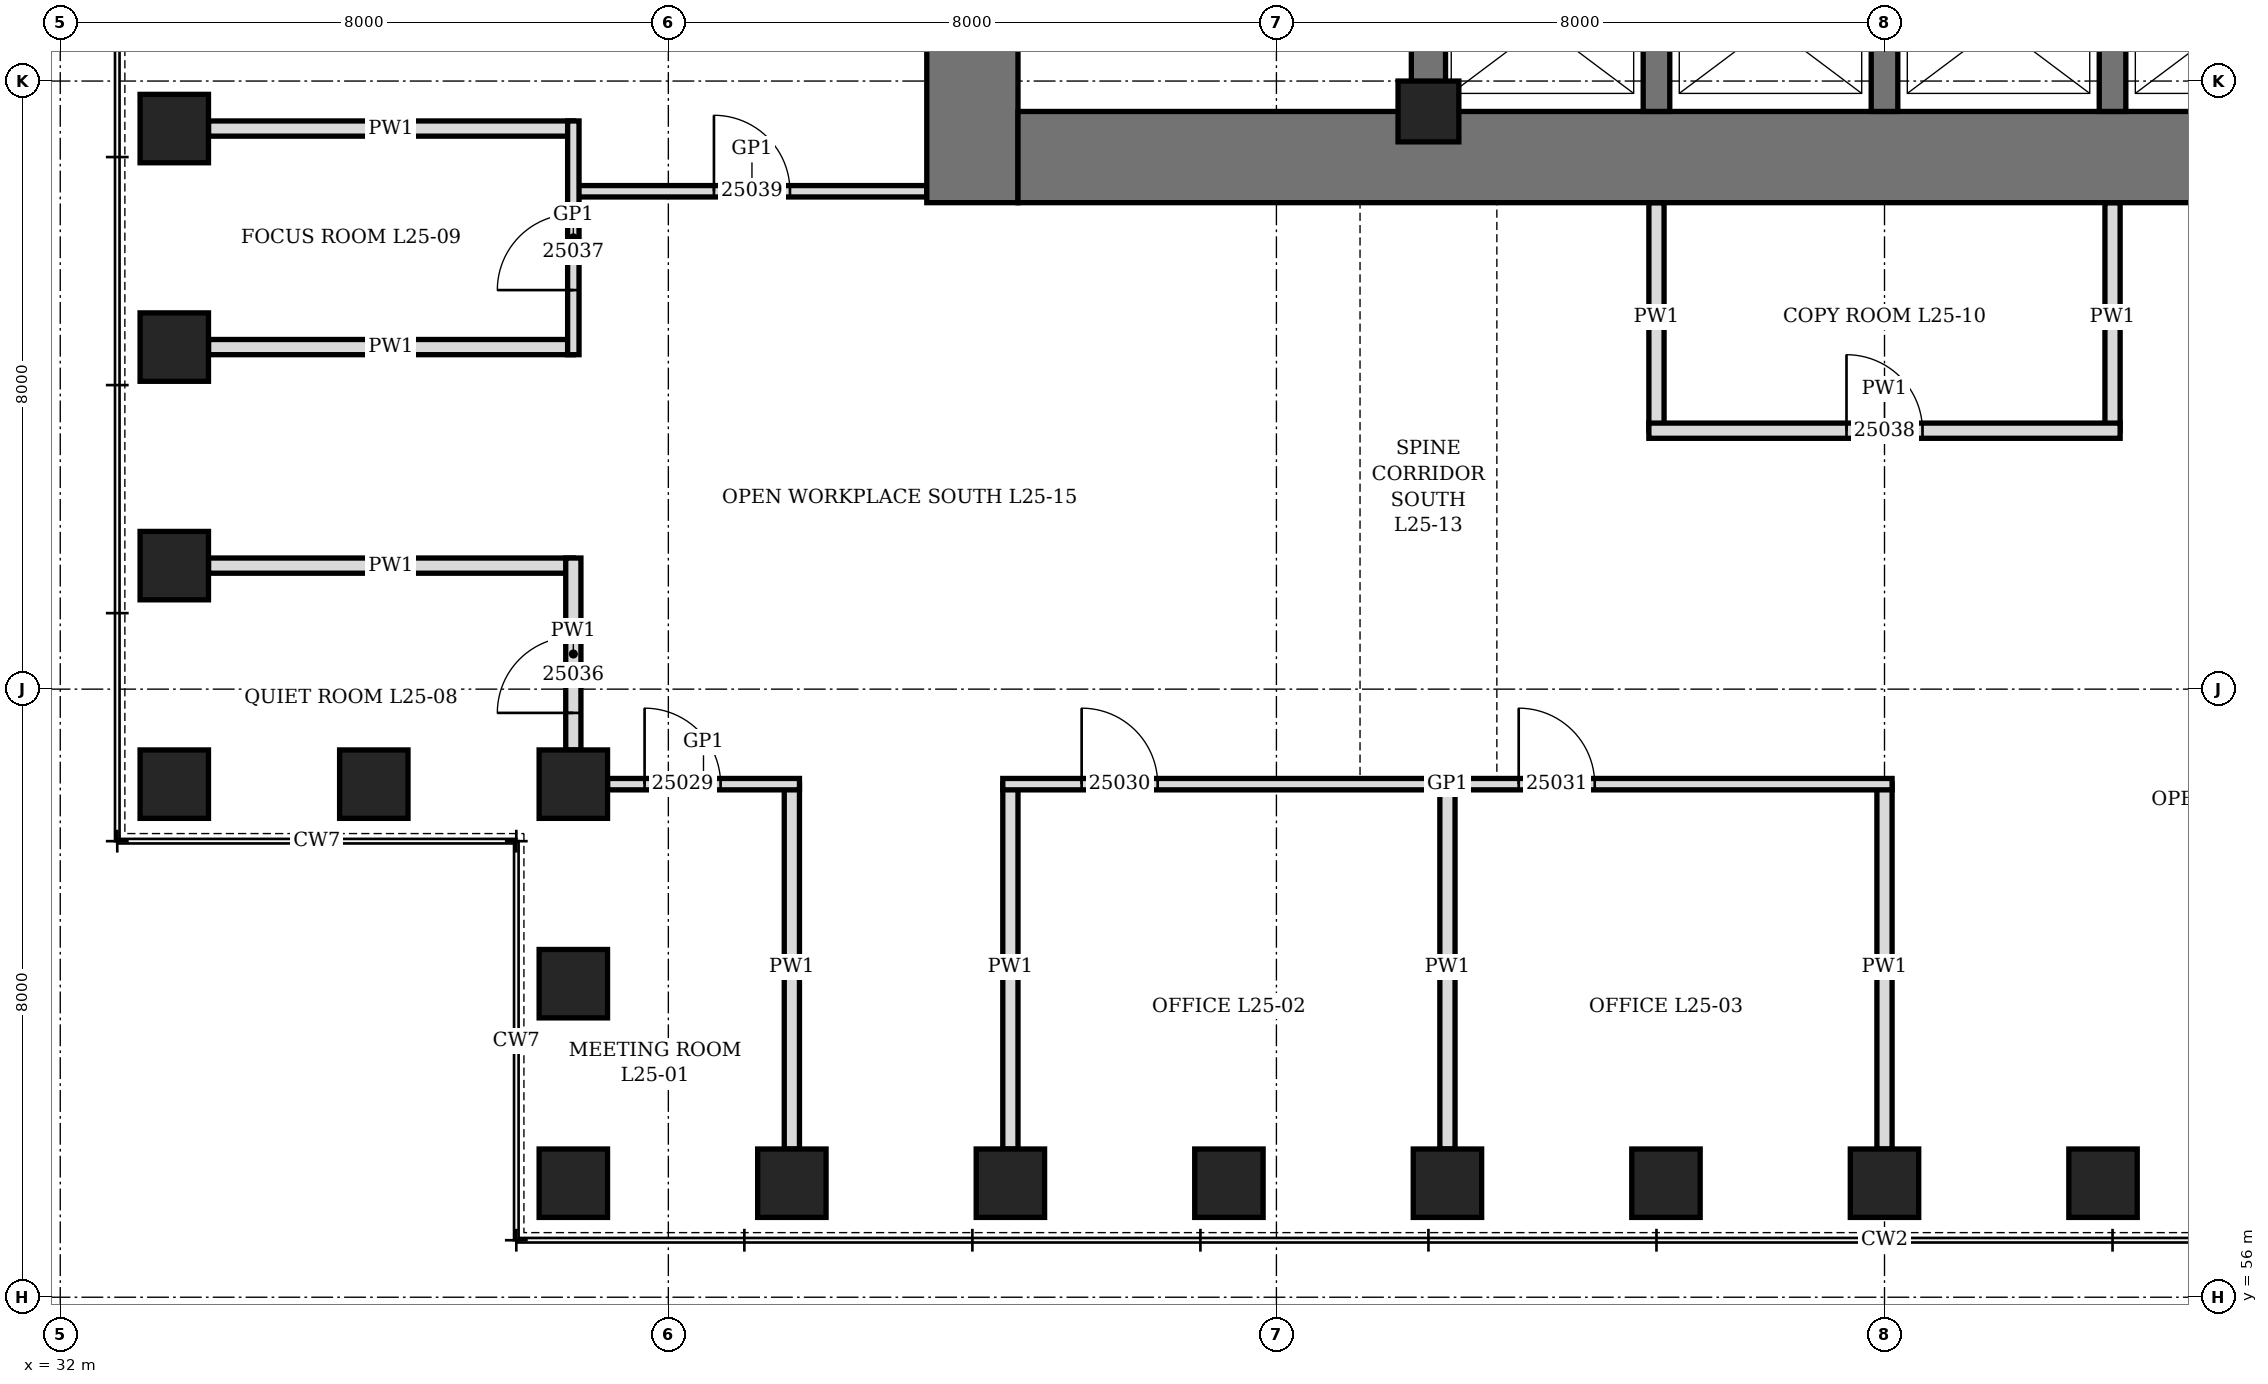
"""IFC4 building model, lengths in metres.
Left out: names, types, materials, properties, quantities, classifications, styles, units other than length and angle.
Written with IfcOpenShell. Run it as: python <this file> out.ifc"""

import sys

from ifc_helpers import new_model, si_unit, direction, frame, frame_2d, origin, origin_2d, place, context, subcontext, project, spatial, rectangle, hollow_rectangle, extrude, element, fill, save


model = new_model("IFC4")
c1 = context("Model", 3, precision=1e-05, world=origin(), true_north=direction((0.0, 1.0)))
c2 = subcontext(c1, "Body", "Model", "MODEL_VIEW")
j1 = project(units=[si_unit("LENGTHUNIT", "METRE"), si_unit("PLANEANGLEUNIT", "RADIAN")], contexts=[c1])
p1 = place(None, origin())
s1 = spatial("IfcSite", under=j1, at=p1, CompositionType="ELEMENT")
p2 = place(p1, origin())
s2 = spatial("IfcBuilding", under=s1, at=p2, CompositionType="ELEMENT")
p3 = place(p2, frame((0.0, 0.0, 116.5)))
s3 = spatial("IfcBuildingStorey", under=s2, at=p3, CompositionType="ELEMENT", Elevation=116.5)
for number, where, z_axis, x_axis in (
    (1, (38.75, 57.5, 0.0), (0.0, 0.0, 1.0), (1.0, 0.0, 0.0)),
    (2, (41.625, 57.5, 0.0), (0.0, 0.0, 1.0), (1.0, 0.0, 0.0)),
    (3, (44.5, 57.5, 0.0), (0.0, 0.0, 1.0), (1.0, 0.0, 0.0)),
    (4, (47.375, 57.5, 0.0), (0.0, 0.0, 1.0), (1.0, 0.0, 0.0)),
    (5, (50.25, 57.5, 0.0), (0.0, 0.0, 1.0), (1.0, 0.0, 0.0)),
    (6, (53.125, 57.5, 0.0), (0.0, 0.0, 1.0), (1.0, 0.0, 0.0)),
    (7, (56.0, 57.5, 0.0), (0.0, 0.0, 1.0), (1.0, 0.0, 0.0)),
    (8, (58.875, 57.5, 0.0), (0.0, 0.0, 1.0), (1.0, 0.0, 0.0)),
    (9, (33.5, 71.375, 0.0), (0.0, 0.0, 1.0), (0.0, 1.0, 0.0)),
    (10, (33.5, 68.5, 0.0), (0.0, 0.0, 1.0), (0.0, 1.0, 0.0)),
    (11, (33.5, 65.625, 0.0), (0.0, 0.0, 1.0), (0.0, 1.0, 0.0)),
    (12, (33.5, 62.75, 0.0), (0.0, 0.0, 1.0), (1.0, 0.0, 0.0)),
    (13, (36.125, 62.75, 0.0), (0.0, 0.0, 1.0), (1.0, 0.0, 0.0)),
    (14, (38.75, 62.75, 0.0), (0.0, 0.0, 1.0), (0.0, 1.0, 0.0)),
    (15, (38.75, 60.125, 0.0), (0.0, 0.0, 1.0), (0.0, 1.0, 0.0)),
):
    element("IfcColumn", number, at=place(p3, frame(where, z_axis=z_axis, x_axis=x_axis)), inside=s3, PredefinedType="COLUMN", context=c2, shape_type="SweptSolid", body=[
        extrude(hollow_rectangle(XDim=0.9, YDim=0.9, WallThickness=0.15, at=origin_2d()), origin(), (0.0, 0.0, 1.0), 4.2),
    ])
p4 = place(p3, frame((44.0, 70.4, 0.0), z_axis=(0.0, 0.0, 1.0), x_axis=(0.0, 1.0, 0.0)))
e16 = element("IfcWall", 16, at=p4, inside=s3, PredefinedType="SHEAR", context=c2, shape_type="SweptSolid", body=[
    extrude(rectangle(XDim=19.2, YDim=1.2, at=frame_2d((9.6, 0.0))), origin(), (0.0, 0.0, 1.0), 4.2),
])
p5 = place(p4, frame((8.6, 0.0, 0.0)))
e17 = element("IfcOpeningElement", 17, at=p5, cuts=e16, PredefinedType="OPENING", context=c2, shape_type="SweptSolid", body=[
    extrude(rectangle(XDim=2.0, YDim=2.4, at=frame_2d((1.0, 1.2))), frame((0.0, 0.61, 0.0), z_axis=(0.0, -1.0, 0.0), x_axis=(1.0, 0.0, 0.0)), (0.0, 0.0, 1.0), 1.22),
])
p6 = place(p3, frame((44.6, 71.0, 0.0), z_axis=(0.0, 0.0, 1.0), x_axis=(1.0, 0.0, 0.0)))
e18 = element("IfcWall", 18, at=p6, inside=s3, PredefinedType="SHEAR", context=c2, shape_type="SweptSolid", body=[
    extrude(rectangle(XDim=22.8, YDim=1.2, at=frame_2d((11.4, 0.0))), origin(), (0.0, 0.0, 1.0), 4.2),
])
p7 = place(p3, frame((50.0, 71.6, 0.0), z_axis=(0.0, 0.0, 1.0), x_axis=(0.0, 1.0, 0.0)))
e19 = element("IfcWall", 19, at=p7, inside=s3, PredefinedType="SHEAR", context=c2, shape_type="SweptSolid", body=[
    extrude(rectangle(XDim=16.8, YDim=0.45, at=frame_2d((8.4, 0.0))), origin(), (0.0, 0.0, 1.0), 4.2),
])
p8 = place(p7, frame((7.5, 0.0, 0.0)))
e20 = element("IfcOpeningElement", 20, at=p8, cuts=e19, PredefinedType="OPENING", context=c2, shape_type="SweptSolid", body=[
    extrude(rectangle(XDim=1.8, YDim=2.4, at=frame_2d((0.9, 1.2))), frame((0.0, 0.235, 0.0), z_axis=(0.0, -1.0, 0.0), x_axis=(1.0, 0.0, 0.0)), (0.0, 0.0, 1.0), 0.47),
])
for number, where, z_axis, x_axis in (
    (21, (53.0, 71.6, 0.0), (0.0, 0.0, 1.0), (0.0, 1.0, 0.0)),
    (22, (56.0, 71.6, 0.0), (0.0, 0.0, 1.0), (0.0, 1.0, 0.0)),
    (23, (59.0, 71.6, 0.0), (0.0, 0.0, 1.0), (0.0, 1.0, 0.0)),
):
    element("IfcWall", number, at=place(p3, frame(where, z_axis=z_axis, x_axis=x_axis)), inside=s3, PredefinedType="SHEAR", context=c2, shape_type="SweptSolid", body=[
        extrude(rectangle(XDim=2.225, YDim=0.35, at=frame_2d((1.112, 0.0))), origin(), (0.0, 0.0, 1.0), 4.2),
    ])
p9 = place(p3, frame((50.0, 71.6, 0.0), z_axis=(0.0, 0.0, 1.0), x_axis=(1.0, 0.0, 0.0)))
e24 = element("IfcColumn", 24, at=p9, inside=s3, PredefinedType="COLUMN", context=c2, shape_type="SweptSolid", body=[
    extrude(hollow_rectangle(XDim=0.8, YDim=0.8, WallThickness=0.1, at=origin_2d()), origin(), (0.0, 0.0, 1.0), 4.2),
])
p10 = place(p3, frame((41.625, 57.95, 0.0), z_axis=(0.0, 0.0, 1.0), x_axis=(0.0, 1.0, 0.0)))
e25 = element("IfcWall", 25, at=p10, inside=s3, PredefinedType="PARTITIONING", context=c2, shape_type="SweptSolid", body=[
    extrude(rectangle(XDim=4.8, YDim=0.2, at=frame_2d((2.4, 0.0))), origin(), (0.0, 0.0, 1.0), 3.428),
])
p11 = place(p3, frame((44.5, 57.95, 0.0), z_axis=(0.0, 0.0, 1.0), x_axis=(0.0, 1.0, 0.0)))
e26 = element("IfcWall", 26, at=p11, inside=s3, PredefinedType="PARTITIONING", context=c2, shape_type="SweptSolid", body=[
    extrude(rectangle(XDim=4.8, YDim=0.2, at=frame_2d((2.4, 0.0))), origin(), (0.0, 0.0, 1.0), 2.74),
])
for number, where, z_axis, x_axis in (
    (27, (50.25, 57.95, 0.0), (0.0, 0.0, 1.0), (0.0, 1.0, 0.0)),
    (28, (56.0, 57.95, 0.0), (0.0, 0.0, 1.0), (0.0, 1.0, 0.0)),
):
    element("IfcWall", number, at=place(p3, frame(where, z_axis=z_axis, x_axis=x_axis)), inside=s3, PredefinedType="PARTITIONING", context=c2, shape_type="SweptSolid", body=[
        extrude(rectangle(XDim=4.8, YDim=0.2, at=frame_2d((2.4, 0.0))), origin(), (0.0, 0.0, 1.0), 3.278),
    ])
for number, where, z_axis, x_axis in (
    (29, (33.95, 65.625, 0.0), (0.0, 0.0, 1.0), (1.0, 0.0, 0.0)),
    (30, (33.95, 68.5, 0.0), (0.0, 0.0, 1.0), (1.0, 0.0, 0.0)),
    (31, (33.95, 71.375, 0.0), (0.0, 0.0, 1.0), (1.0, 0.0, 0.0)),
):
    element("IfcWall", number, at=place(p3, frame(where, z_axis=z_axis, x_axis=x_axis)), inside=s3, PredefinedType="PARTITIONING", context=c2, shape_type="SweptSolid", body=[
        extrude(rectangle(XDim=4.8, YDim=0.2, at=frame_2d((2.4, 0.0))), origin(), (0.0, 0.0, 1.0), 3.428),
    ])
for number, where, z_axis, x_axis in (
    (32, (53.0, 67.4, 0.0), (0.0, 0.0, 1.0), (0.0, 1.0, 0.0)),
    (33, (59.0, 67.4, 0.0), (0.0, 0.0, 1.0), (0.0, 1.0, 0.0)),
):
    element("IfcWall", number, at=place(p3, frame(where, z_axis=z_axis, x_axis=x_axis)), inside=s3, PredefinedType="PARTITIONING", context=c2, shape_type="SweptSolid", body=[
        extrude(rectangle(XDim=3.0, YDim=0.2, at=frame_2d((1.5, 0.0))), origin(), (0.0, 0.0, 1.0), 3.278),
    ])
p12 = place(p3, frame((39.2, 62.75, 0.0), z_axis=(0.0, 0.0, 1.0), x_axis=(1.0, 0.0, 0.0)))
e34 = element("IfcWall", 34, at=p12, inside=s3, PredefinedType="PARTITIONING", context=c2, shape_type="SweptSolid", body=[
    extrude(rectangle(XDim=2.525, YDim=0.15, at=frame_2d((1.263, 0.0))), origin(), (0.0, 0.0, 1.0), 4.04),
])
p13 = place(p12, frame((0.488, 0.0, 0.0)))
e35 = element("IfcOpeningElement", 35, at=p13, cuts=e34, PredefinedType="OPENING", context=c2, shape_type="SweptSolid", body=[
    extrude(rectangle(XDim=1.0, YDim=2.4, at=frame_2d((0.5, 1.2))), frame((0.0, 0.085, 0.0), z_axis=(0.0, -1.0, 0.0), x_axis=(1.0, 0.0, 0.0)), (0.0, 0.0, 1.0), 0.17),
])
p14 = place(p3, frame((44.4, 62.75, 0.0), z_axis=(0.0, 0.0, 1.0), x_axis=(1.0, 0.0, 0.0)))
e36 = element("IfcWall", 36, at=p14, inside=s3, PredefinedType="PARTITIONING", context=c2, shape_type="SweptSolid", body=[
    extrude(rectangle(XDim=11.7, YDim=0.15, at=frame_2d((5.85, 0.0))), origin(), (0.0, 0.0, 1.0), 4.04),
])
p15 = place(p14, frame((1.038, 0.0, 0.0)))
e37 = element("IfcOpeningElement", 37, at=p15, cuts=e36, PredefinedType="OPENING", context=c2, shape_type="SweptSolid", body=[
    extrude(rectangle(XDim=1.0, YDim=2.1, at=frame_2d((0.5, 1.05))), frame((0.0, 0.085, 0.0), z_axis=(0.0, -1.0, 0.0), x_axis=(1.0, 0.0, 0.0)), (0.0, 0.0, 1.0), 0.17),
])
p16 = place(p14, frame((6.788, 0.0, 0.0)))
e38 = element("IfcOpeningElement", 38, at=p16, cuts=e36, PredefinedType="OPENING", context=c2, shape_type="SweptSolid", body=[
    extrude(rectangle(XDim=1.0, YDim=2.1, at=frame_2d((0.5, 1.05))), frame((0.0, 0.085, 0.0), z_axis=(0.0, -1.0, 0.0), x_axis=(1.0, 0.0, 0.0)), (0.0, 0.0, 1.0), 0.17),
])
p17 = place(p3, frame((52.9, 67.4, 0.0), z_axis=(0.0, 0.0, 1.0), x_axis=(1.0, 0.0, 0.0)))
e39 = element("IfcWall", 39, at=p17, inside=s3, PredefinedType="PARTITIONING", context=c2, shape_type="SweptSolid", body=[
    extrude(rectangle(XDim=6.2, YDim=0.2, at=frame_2d((3.1, 0.0))), origin(), (0.0, 0.0, 1.0), 4.04),
])
p18 = place(p17, frame((2.6, 0.0, 0.0)))
e40 = element("IfcOpeningElement", 40, at=p18, cuts=e39, PredefinedType="OPENING", context=c2, shape_type="SweptSolid", body=[
    extrude(rectangle(XDim=1.0, YDim=2.1, at=frame_2d((0.5, 1.05))), frame((0.0, 0.11, 0.0), z_axis=(0.0, -1.0, 0.0), x_axis=(1.0, 0.0, 0.0)), (0.0, 0.0, 1.0), 0.22),
])
p19 = place(p3, frame((38.8, 70.55, 0.0), z_axis=(0.0, 0.0, 1.0), x_axis=(1.0, 0.0, 0.0)))
e41 = element("IfcWall", 41, at=p19, inside=s3, PredefinedType="PARTITIONING", context=c2, shape_type="SweptSolid", body=[
    extrude(rectangle(XDim=4.6, YDim=0.15, at=frame_2d((2.3, 0.0))), origin(), (0.0, 0.0, 1.0), 4.04),
])
p20 = place(p19, frame((1.8, 0.0, 0.0)))
e42 = element("IfcOpeningElement", 42, at=p20, cuts=e41, PredefinedType="OPENING", context=c2, shape_type="SweptSolid", body=[
    extrude(rectangle(XDim=1.0, YDim=2.4, at=frame_2d((0.5, 1.2))), frame((0.0, 0.085, 0.0), z_axis=(0.0, -1.0, 0.0), x_axis=(1.0, 0.0, 0.0)), (0.0, 0.0, 1.0), 0.17),
])
p21 = place(p3, frame((38.75, 68.4, 0.0), z_axis=(0.0, 0.0, 1.0), x_axis=(0.0, 1.0, 0.0)))
e43 = element("IfcWall", 43, at=p21, inside=s3, PredefinedType="PARTITIONING", context=c2, shape_type="SweptSolid", body=[
    extrude(rectangle(XDim=3.075, YDim=0.15, at=frame_2d((1.538, 0.0))), origin(), (0.0, 0.0, 1.0), 4.04),
])
p22 = place(p21, frame((0.85, 0.0, 0.0)))
e44 = element("IfcOpeningElement", 44, at=p22, cuts=e43, PredefinedType="OPENING", context=c2, shape_type="SweptSolid", body=[
    extrude(rectangle(XDim=1.0, YDim=2.4, at=frame_2d((0.5, 1.2))), frame((0.0, 0.085, 0.0), z_axis=(0.0, -1.0, 0.0), x_axis=(1.0, 0.0, 0.0)), (0.0, 0.0, 1.0), 0.17),
])
p23 = place(p3, frame((38.75, 63.2, 0.0), z_axis=(0.0, 0.0, 1.0), x_axis=(0.0, 1.0, 0.0)))
e45 = element("IfcWall", 45, at=p23, inside=s3, PredefinedType="PARTITIONING", context=c2, shape_type="SweptSolid", body=[
    extrude(rectangle(XDim=2.525, YDim=0.2, at=frame_2d((1.263, 0.0))), origin(), (0.0, 0.0, 1.0), 4.04),
])
p24 = place(p23, frame((0.488, 0.0, 0.0)))
e46 = element("IfcOpeningElement", 46, at=p24, cuts=e45, PredefinedType="OPENING", context=c2, shape_type="SweptSolid", body=[
    extrude(rectangle(XDim=1.0, YDim=2.1, at=frame_2d((0.5, 1.05))), frame((0.0, 0.11, 0.0), z_axis=(0.0, -1.0, 0.0), x_axis=(1.0, 0.0, 0.0)), (0.0, 0.0, 1.0), 0.22),
])
p25 = place(p13, origin())
e47 = element("IfcDoor", 47, at=p25, inside=s3, OperationType="SINGLE_SWING_RIGHT", PredefinedType="DOOR", context=c2, shape_type="SweptSolid", body=[
    extrude(rectangle(XDim=1.0, YDim=2.4, at=frame_2d((0.5, 1.2))), frame((0.0, 0.075, 0.0), z_axis=(0.0, -1.0, 0.0), x_axis=(1.0, 0.0, 0.0)), (0.0, 0.0, 1.0), 0.149),
])
fill(e35, e47)
p26 = place(p15, origin())
e48 = element("IfcDoor", 48, at=p26, inside=s3, OperationType="SINGLE_SWING_LEFT", PredefinedType="DOOR", context=c2, shape_type="SweptSolid", body=[
    extrude(rectangle(XDim=1.0, YDim=2.1, at=frame_2d((0.5, 1.05))), frame((0.0, 0.075, 0.0), z_axis=(0.0, -1.0, 0.0), x_axis=(1.0, 0.0, 0.0)), (0.0, 0.0, 1.0), 0.149),
])
fill(e37, e48)
p27 = place(p16, origin())
e49 = element("IfcDoor", 49, at=p27, inside=s3, OperationType="SINGLE_SWING_LEFT", PredefinedType="DOOR", context=c2, shape_type="SweptSolid", body=[
    extrude(rectangle(XDim=1.0, YDim=2.1, at=frame_2d((0.5, 1.05))), frame((0.0, 0.075, 0.0), z_axis=(0.0, -1.0, 0.0), x_axis=(1.0, 0.0, 0.0)), (0.0, 0.0, 1.0), 0.149),
])
fill(e38, e49)
p28 = place(p24, origin())
e50 = element("IfcDoor", 50, at=p28, inside=s3, OperationType="SINGLE_SWING_LEFT", PredefinedType="DOOR", context=c2, shape_type="SweptSolid", body=[
    extrude(rectangle(XDim=1.0, YDim=2.1, at=frame_2d((0.5, 1.05))), frame((0.0, 0.1, 0.0), z_axis=(0.0, -1.0, 0.0), x_axis=(1.0, 0.0, 0.0)), (0.0, 0.0, 1.0), 0.199),
])
fill(e46, e50)
p29 = place(p22, origin())
e51 = element("IfcDoor", 51, at=p29, inside=s3, OperationType="SINGLE_SWING_RIGHT", PredefinedType="DOOR", context=c2, shape_type="SweptSolid", body=[
    extrude(rectangle(XDim=1.0, YDim=2.4, at=frame_2d((0.5, 1.2))), frame((0.0, 0.075, 0.0), z_axis=(0.0, -1.0, 0.0), x_axis=(1.0, 0.0, 0.0)), (0.0, 0.0, 1.0), 0.149),
])
fill(e44, e51)
p30 = place(p18, origin())
e52 = element("IfcDoor", 52, at=p30, inside=s3, OperationType="SINGLE_SWING_LEFT", PredefinedType="DOOR", context=c2, shape_type="SweptSolid", body=[
    extrude(rectangle(XDim=1.0, YDim=2.1, at=frame_2d((0.5, 1.05))), frame((0.0, 0.1, 0.0), z_axis=(0.0, -1.0, 0.0), x_axis=(1.0, 0.0, 0.0)), (0.0, 0.0, 1.0), 0.199),
])
fill(e40, e52)
p31 = place(p20, origin())
e53 = element("IfcDoor", 53, at=p31, inside=s3, OperationType="SINGLE_SWING_RIGHT", PredefinedType="DOOR", context=c2, shape_type="SweptSolid", body=[
    extrude(rectangle(XDim=1.0, YDim=2.4, at=frame_2d((0.5, 1.2))), frame((0.0, 0.075, 0.0), z_axis=(0.0, -1.0, 0.0), x_axis=(1.0, 0.0, 0.0)), (0.0, 0.0, 1.0), 0.149),
])
fill(e42, e53)
save(model, sys.argv[1])
